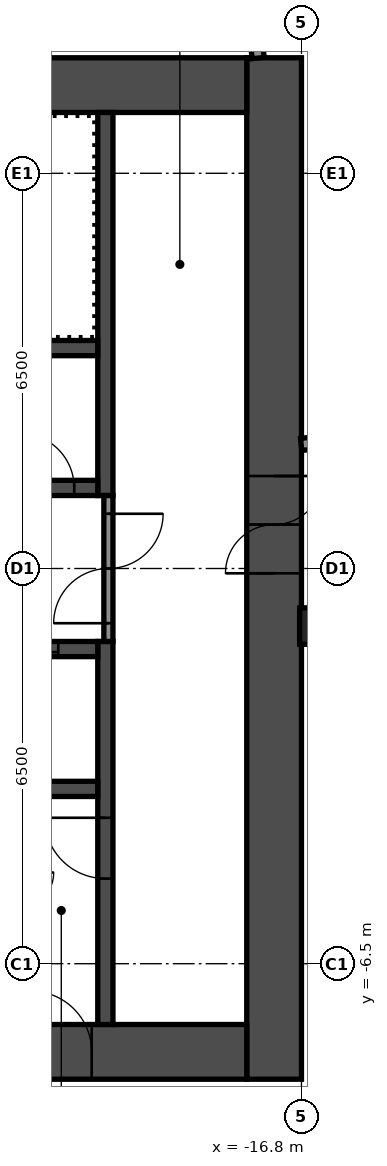
"""IFC4 building model, lengths in metres.
Left out: names, types, materials, properties, quantities, classifications, styles, units other than length and angle.
Written with IfcOpenShell. Run it as: python <this file> out.ifc"""

import sys

from ifc_helpers import new_model, si_unit, direction, frame, frame_2d, origin, origin_2d, place, context, subcontext, project, spatial, rectangle, hollow_rectangle, extrude, element, fill, save


model = new_model("IFC4")
c1 = context("Model", 3, precision=1e-05, world=origin(), true_north=direction((0.0, 1.0)))
c2 = subcontext(c1, "Body", "Model", "MODEL_VIEW")
j1 = project(units=[si_unit("LENGTHUNIT", "METRE"), si_unit("PLANEANGLEUNIT", "RADIAN")], contexts=[c1])
p1 = place(None, origin())
s1 = spatial("IfcSite", under=j1, at=p1, CompositionType="ELEMENT")
p2 = place(p1, origin())
s2 = spatial("IfcBuilding", under=s1, at=p2, CompositionType="ELEMENT")
p3 = place(p2, frame((0.0, 0.0, 239.0)))
s3 = spatial("IfcBuildingStorey", under=s2, at=p3, CompositionType="ELEMENT", Elevation=239.0)
p4 = place(p3, frame((-16.53, -0.947, 0.0), z_axis=(0.0, 0.0, 1.0), x_axis=(1.0, 0.0, 0.0)))
e1 = element("IfcColumn", 1, at=p4, inside=s3, PredefinedType="COLUMN", context=c2, shape_type="SweptSolid", body=[
    extrude(hollow_rectangle(XDim=0.6, YDim=0.6, WallThickness=0.025, InnerFilletRadius=0.038, OuterFilletRadius=0.062, at=origin_2d()), origin(), (0.0, 0.0, 1.0), 2.75),
])
p5 = place(p3, frame((-17.25, -8.4, 0.0), z_axis=(0.0, 0.0, 1.0), x_axis=(0.0, 1.0, 0.0)))
e2 = element("IfcWall", 2, at=p5, inside=s3, PredefinedType="SHEAR", context=c2, shape_type="SweptSolid", body=[
    extrude(rectangle(XDim=16.8, YDim=0.9, at=frame_2d((8.4, 0.0))), origin(), (0.0, 0.0, 1.0), 2.75),
])
p6 = place(p5, frame((8.321, 0.0, 0.0)))
e3 = element("IfcOpeningElement", 3, at=p6, cuts=e2, PredefinedType="OPENING", context=c2, shape_type="SweptSolid", body=[
    extrude(rectangle(XDim=1.6, YDim=2.1, at=frame_2d((0.8, 1.05))), frame((0.0, 0.46, 0.0), z_axis=(0.0, -1.0, 0.0), x_axis=(1.0, 0.0, 0.0)), (0.0, 0.0, 1.0), 0.92),
])
p7 = place(p3, frame((-32.7, 7.95, 0.0), z_axis=(0.0, 0.0, 1.0), x_axis=(1.0, 0.0, 0.0)))
e4 = element("IfcWall", 4, at=p7, inside=s3, PredefinedType="SHEAR", context=c2, shape_type="SweptSolid", body=[
    extrude(rectangle(XDim=15.0, YDim=0.9, at=frame_2d((7.5, 0.0))), origin(), (0.0, 0.0, 1.0), 2.75),
])
p8 = place(p7, frame((3.4, 0.0, 0.0)))
e5 = element("IfcOpeningElement", 5, at=p8, cuts=e4, PredefinedType="OPENING", context=c2, shape_type="SweptSolid", body=[
    extrude(rectangle(XDim=1.2, YDim=2.1, at=frame_2d((0.6, 1.05))), frame((0.0, 0.46, 0.0), z_axis=(0.0, -1.0, 0.0), x_axis=(1.0, 0.0, 0.0)), (0.0, 0.0, 1.0), 0.92),
])
p9 = place(p7, frame((0.75, 0.0, 0.0)))
e6 = element("IfcOpeningElement", 6, at=p9, cuts=e4, PredefinedType="OPENING", context=c2, shape_type="SweptSolid", body=[
    extrude(rectangle(XDim=0.9, YDim=2.1, at=frame_2d((0.45, 1.05))), frame((0.0, 0.46, 0.0), z_axis=(0.0, -1.0, 0.0), x_axis=(1.0, 0.0, 0.0)), (0.0, 0.0, 1.0), 0.92),
])
p10 = place(p3, frame((-32.7, -7.95, 0.0), z_axis=(0.0, 0.0, 1.0), x_axis=(1.0, 0.0, 0.0)))
e7 = element("IfcWall", 7, at=p10, inside=s3, PredefinedType="SHEAR", context=c2, shape_type="SweptSolid", body=[
    extrude(rectangle(XDim=15.0, YDim=0.9, at=frame_2d((7.5, 0.0))), origin(), (0.0, 0.0, 1.0), 2.75),
])
p11 = place(p10, frame((11.45, 0.0, 0.0)))
e8 = element("IfcOpeningElement", 8, at=p11, cuts=e7, PredefinedType="OPENING", context=c2, shape_type="SweptSolid", body=[
    extrude(rectangle(XDim=1.0, YDim=2.1, at=frame_2d((0.5, 1.05))), frame((0.0, 0.46, 0.0), z_axis=(0.0, -1.0, 0.0), x_axis=(1.0, 0.0, 0.0)), (0.0, 0.0, 1.0), 0.92),
])
p12 = place(p3, frame((-20.025, 1.2, 0.0), z_axis=(0.0, 0.0, 1.0), x_axis=(0.0, 1.0, 0.0)))
e9 = element("IfcWall", 9, at=p12, inside=s3, PredefinedType="SHEAR", context=c2, shape_type="SweptSolid", body=[
    extrude(rectangle(XDim=6.3, YDim=0.25, at=frame_2d((3.15, 0.0))), origin(), (0.0, 0.0, 1.0), 2.75),
])
p13 = place(p3, frame((-20.025, -7.5, 0.0), z_axis=(0.0, 0.0, 1.0), x_axis=(0.0, 1.0, 0.0)))
e10 = element("IfcWall", 10, at=p13, inside=s3, PredefinedType="SHEAR", context=c2, shape_type="SweptSolid", body=[
    extrude(rectangle(XDim=6.3, YDim=0.25, at=frame_2d((3.15, 0.0))), origin(), (0.0, 0.0, 1.0), 2.75),
])
p14 = place(p13, frame((2.4, 0.0, 0.0)))
e11 = element("IfcOpeningElement", 11, at=p14, cuts=e10, PredefinedType="OPENING", context=c2, shape_type="SweptSolid", body=[
    extrude(rectangle(XDim=1.0, YDim=2.1, at=frame_2d((0.5, 1.05))), frame((0.0, 0.135, 0.0), z_axis=(0.0, -1.0, 0.0), x_axis=(1.0, 0.0, 0.0)), (0.0, 0.0, 1.0), 0.27),
])
p15 = place(p3, frame((-27.65, 1.325, 0.0), z_axis=(0.0, 0.0, 1.0), x_axis=(1.0, 0.0, 0.0)))
e12 = element("IfcWall", 12, at=p15, inside=s3, PredefinedType="SHEAR", context=c2, shape_type="SweptSolid", body=[
    extrude(rectangle(XDim=7.5, YDim=0.25, at=frame_2d((3.75, 0.0))), origin(), (0.0, 0.0, 1.0), 2.75),
])
p16 = place(p15, frame((6.212, 0.0, 0.0)))
e13 = element("IfcOpeningElement", 13, at=p16, cuts=e12, PredefinedType="OPENING", context=c2, shape_type="SweptSolid", body=[
    extrude(rectangle(XDim=0.9, YDim=2.1, at=frame_2d((0.45, 1.05))), frame((0.0, 0.135, 0.0), z_axis=(0.0, -1.0, 0.0), x_axis=(1.0, 0.0, 0.0)), (0.0, 0.0, 1.0), 0.27),
])
p17 = place(p15, frame((2.512, 0.0, 0.0)))
e14 = element("IfcOpeningElement", 14, at=p17, cuts=e12, PredefinedType="OPENING", context=c2, shape_type="SweptSolid", body=[
    extrude(rectangle(XDim=0.9, YDim=2.1, at=frame_2d((0.45, 1.05))), frame((0.0, 0.135, 0.0), z_axis=(0.0, -1.0, 0.0), x_axis=(1.0, 0.0, 0.0)), (0.0, 0.0, 1.0), 0.27),
])
p18 = place(p3, frame((-27.65, 3.625, 0.0), z_axis=(0.0, 0.0, 1.0), x_axis=(1.0, 0.0, 0.0)))
e15 = element("IfcWall", 15, at=p18, inside=s3, PredefinedType="SHEAR", context=c2, shape_type="SweptSolid", body=[
    extrude(rectangle(XDim=7.5, YDim=0.25, at=frame_2d((3.75, 0.0))), origin(), (0.0, 0.0, 1.0), 2.75),
])
p19 = place(p3, frame((-27.65, -1.325, 0.0), z_axis=(0.0, 0.0, 1.0), x_axis=(1.0, 0.0, 0.0)))
e16 = element("IfcWall", 16, at=p19, inside=s3, PredefinedType="SHEAR", context=c2, shape_type="SweptSolid", body=[
    extrude(rectangle(XDim=7.5, YDim=0.25, at=frame_2d((3.75, 0.0))), origin(), (0.0, 0.0, 1.0), 2.75),
])
p20 = place(p19, frame((5.75, 0.0, 0.0)))
e17 = element("IfcOpeningElement", 17, at=p20, cuts=e16, PredefinedType="OPENING", context=c2, shape_type="SweptSolid", body=[
    extrude(rectangle(XDim=1.1, YDim=2.1, at=frame_2d((0.55, 1.05))), frame((0.0, 0.135, 0.0), z_axis=(0.0, -1.0, 0.0), x_axis=(1.0, 0.0, 0.0)), (0.0, 0.0, 1.0), 0.27),
])
p21 = place(p19, frame((3.35, 0.0, 0.0)))
e18 = element("IfcOpeningElement", 18, at=p21, cuts=e16, PredefinedType="OPENING", context=c2, shape_type="SweptSolid", body=[
    extrude(rectangle(XDim=1.1, YDim=2.1, at=frame_2d((0.55, 1.05))), frame((0.0, 0.135, 0.0), z_axis=(0.0, -1.0, 0.0), x_axis=(1.0, 0.0, 0.0)), (0.0, 0.0, 1.0), 0.27),
])
p22 = place(p19, frame((0.95, 0.0, 0.0)))
e19 = element("IfcOpeningElement", 19, at=p22, cuts=e16, PredefinedType="OPENING", context=c2, shape_type="SweptSolid", body=[
    extrude(rectangle(XDim=1.1, YDim=2.1, at=frame_2d((0.55, 1.05))), frame((0.0, 0.135, 0.0), z_axis=(0.0, -1.0, 0.0), x_axis=(1.0, 0.0, 0.0)), (0.0, 0.0, 1.0), 0.27),
])
p23 = place(p3, frame((-27.65, -3.625, 0.0), z_axis=(0.0, 0.0, 1.0), x_axis=(1.0, 0.0, 0.0)))
e20 = element("IfcWall", 20, at=p23, inside=s3, PredefinedType="SHEAR", context=c2, shape_type="SweptSolid", body=[
    extrude(rectangle(XDim=7.5, YDim=0.25, at=frame_2d((3.75, 0.0))), origin(), (0.0, 0.0, 1.0), 2.75),
])
p24 = place(p3, frame((-19.975, -1.2, 0.0), z_axis=(0.0, 0.0, 1.0), x_axis=(0.0, 1.0, 0.0)))
e21 = element("IfcWall", 21, at=p24, inside=s3, PredefinedType="PARTITIONING", context=c2, shape_type="SweptSolid", body=[
    extrude(rectangle(XDim=2.4, YDim=0.15, at=frame_2d((1.2, 0.0))), origin(), (0.0, 0.0, 1.0), 2.75),
])
p25 = place(p24, frame((0.3, 0.0, 0.0)))
e22 = element("IfcOpeningElement", 22, at=p25, cuts=e21, PredefinedType="OPENING", context=c2, shape_type="SweptSolid", body=[
    extrude(rectangle(XDim=1.8, YDim=2.1, at=frame_2d((0.9, 1.05))), frame((0.0, 0.085, 0.0), z_axis=(0.0, -1.0, 0.0), x_axis=(1.0, 0.0, 0.0)), (0.0, 0.0, 1.0), 0.17),
])
p26 = place(p3, frame((-16.805, 2.041, 0.0), z_axis=(0.0, 0.0, 1.0), x_axis=(0.994521146831, 0.104535584879, 0.0)))
e23 = element("IfcWall", 23, at=p26, inside=s3, PredefinedType="PARTITIONING", context=c2, shape_type="SweptSolid", body=[
    extrude(rectangle(XDim=33.561, YDim=0.2, at=frame_2d((16.78, 0.0))), origin(), (0.0, 0.0, 1.0), 2.75),
])
p27 = place(p26, frame((2.201, 0.0, 0.0)))
e24 = element("IfcOpeningElement", 24, at=p27, cuts=e23, PredefinedType="OPENING", context=c2, shape_type="SweptSolid", body=[
    extrude(rectangle(XDim=0.9, YDim=2.1, at=frame_2d((0.45, 1.05))), frame((0.0, 0.11, 0.0), z_axis=(0.0, -1.0, 0.0), x_axis=(1.0, 0.0, 0.0)), (0.0, 0.0, 1.0), 0.22),
])
p28 = place(p26, frame((6.401, 0.0, 0.0)))
e25 = element("IfcOpeningElement", 25, at=p28, cuts=e23, PredefinedType="OPENING", context=c2, shape_type="SweptSolid", body=[
    extrude(rectangle(XDim=0.9, YDim=2.1, at=frame_2d((0.45, 1.05))), frame((0.0, 0.11, 0.0), z_axis=(0.0, -1.0, 0.0), x_axis=(1.0, 0.0, 0.0)), (0.0, 0.0, 1.0), 0.22),
])
p29 = place(p26, frame((10.516, 0.0, 0.0)))
e26 = element("IfcOpeningElement", 26, at=p29, cuts=e23, PredefinedType="OPENING", context=c2, shape_type="SweptSolid", body=[
    extrude(rectangle(XDim=0.9, YDim=2.1, at=frame_2d((0.45, 1.05))), frame((0.0, 0.11, 0.0), z_axis=(0.0, -1.0, 0.0), x_axis=(1.0, 0.0, 0.0)), (0.0, 0.0, 1.0), 0.22),
])
p30 = place(p26, frame((14.716, 0.0, 0.0)))
e27 = element("IfcOpeningElement", 27, at=p30, cuts=e23, PredefinedType="OPENING", context=c2, shape_type="SweptSolid", body=[
    extrude(rectangle(XDim=0.9, YDim=2.1, at=frame_2d((0.45, 1.05))), frame((0.0, 0.11, 0.0), z_axis=(0.0, -1.0, 0.0), x_axis=(1.0, 0.0, 0.0)), (0.0, 0.0, 1.0), 0.22),
])
p31 = place(p26, frame((18.241, 0.0, 0.0)))
e28 = element("IfcOpeningElement", 28, at=p31, cuts=e23, PredefinedType="OPENING", context=c2, shape_type="SweptSolid", body=[
    extrude(rectangle(XDim=0.9, YDim=2.1, at=frame_2d((0.45, 1.05))), frame((0.0, 0.11, 0.0), z_axis=(0.0, -1.0, 0.0), x_axis=(1.0, 0.0, 0.0)), (0.0, 0.0, 1.0), 0.22),
])
p32 = place(p26, frame((22.441, 0.0, 0.0)))
e29 = element("IfcOpeningElement", 29, at=p32, cuts=e23, PredefinedType="OPENING", context=c2, shape_type="SweptSolid", body=[
    extrude(rectangle(XDim=0.9, YDim=2.1, at=frame_2d((0.45, 1.05))), frame((0.0, 0.11, 0.0), z_axis=(0.0, -1.0, 0.0), x_axis=(1.0, 0.0, 0.0)), (0.0, 0.0, 1.0), 0.22),
])
p33 = place(p26, frame((26.981, 0.0, 0.0)))
e30 = element("IfcOpeningElement", 30, at=p33, cuts=e23, PredefinedType="OPENING", context=c2, shape_type="SweptSolid", body=[
    extrude(rectangle(XDim=0.9, YDim=2.1, at=frame_2d((0.45, 1.05))), frame((0.0, 0.11, 0.0), z_axis=(0.0, -1.0, 0.0), x_axis=(1.0, 0.0, 0.0)), (0.0, 0.0, 1.0), 0.22),
])
p34 = place(p26, frame((31.181, 0.0, 0.0)))
e31 = element("IfcOpeningElement", 31, at=p34, cuts=e23, PredefinedType="OPENING", context=c2, shape_type="SweptSolid", body=[
    extrude(rectangle(XDim=0.9, YDim=2.1, at=frame_2d((0.45, 1.05))), frame((0.0, 0.11, 0.0), z_axis=(0.0, -1.0, 0.0), x_axis=(1.0, 0.0, 0.0)), (0.0, 0.0, 1.0), 0.22),
])
p35 = place(p3, frame((-17.512, 8.395, 0.0), z_axis=(0.0, 0.0, 1.0), x_axis=(-0.104524714473, 0.994522289375, 0.0)))
e32 = element("IfcWall", 32, at=p35, inside=s3, PredefinedType="PARTITIONING", context=c2, shape_type="SweptSolid", body=[
    extrude(rectangle(XDim=9.607, YDim=0.2, at=frame_2d((4.803, 0.0))), origin(), (0.0, 0.0, 1.0), 2.75),
])
p36 = place(p6, origin())
e33 = element("IfcDoor", 33, at=p36, inside=s3, OperationType="DOUBLE_DOOR_SINGLE_SWING", PredefinedType="DOOR", context=c2, shape_type="SweptSolid", body=[
    extrude(rectangle(XDim=1.6, YDim=2.1, at=frame_2d((0.8, 1.05))), frame((0.0, 0.025, 0.0), z_axis=(0.0, -1.0, 0.0), x_axis=(1.0, 0.0, 0.0)), (0.0, 0.0, 1.0), 0.05),
])
fill(e3, e33)
p37 = place(p11, origin())
e34 = element("IfcDoor", 34, at=p37, inside=s3, OperationType="SINGLE_SWING_RIGHT", PredefinedType="DOOR", context=c2, shape_type="SweptSolid", body=[
    extrude(rectangle(XDim=1.0, YDim=2.1, at=frame_2d((0.5, 1.05))), frame((0.0, 0.025, 0.0), z_axis=(0.0, -1.0, 0.0), x_axis=(1.0, 0.0, 0.0)), (0.0, 0.0, 1.0), 0.05),
])
fill(e8, e34)
p38 = place(p14, origin())
e35 = element("IfcDoor", 35, at=p38, inside=s3, OperationType="SINGLE_SWING_LEFT", PredefinedType="DOOR", context=c2, shape_type="SweptSolid", body=[
    extrude(rectangle(XDim=1.0, YDim=2.1, at=frame_2d((0.5, 1.05))), frame((0.0, 0.025, 0.0), z_axis=(0.0, -1.0, 0.0), x_axis=(1.0, 0.0, 0.0)), (0.0, 0.0, 1.0), 0.05),
])
fill(e11, e35)
p39 = place(p25, origin())
e36 = element("IfcDoor", 36, at=p39, inside=s3, OperationType="DOUBLE_DOOR_SINGLE_SWING", PredefinedType="DOOR", context=c2, shape_type="SweptSolid", body=[
    extrude(rectangle(XDim=1.8, YDim=2.1, at=frame_2d((0.9, 1.05))), frame((0.0, 0.025, 0.0), z_axis=(0.0, -1.0, 0.0), x_axis=(1.0, 0.0, 0.0)), (0.0, 0.0, 1.0), 0.05),
])
fill(e22, e36)
p40 = place(p16, origin())
e37 = element("IfcDoor", 37, at=p40, inside=s3, OperationType="SINGLE_SWING_RIGHT", PredefinedType="DOOR", context=c2, shape_type="SweptSolid", body=[
    extrude(rectangle(XDim=0.9, YDim=2.1, at=frame_2d((0.45, 1.05))), frame((0.0, 0.025, 0.0), z_axis=(0.0, -1.0, 0.0), x_axis=(1.0, 0.0, 0.0)), (0.0, 0.0, 1.0), 0.05),
])
fill(e13, e37)
p41 = place(p20, origin())
e38 = element("IfcDoor", 38, at=p41, inside=s3, OperationType="DOUBLE_DOOR_SLIDING", PredefinedType="DOOR", context=c2, shape_type="SweptSolid", body=[
    extrude(rectangle(XDim=1.1, YDim=2.1, at=frame_2d((0.55, 1.05))), frame((0.0, 0.025, 0.0), z_axis=(0.0, -1.0, 0.0), x_axis=(1.0, 0.0, 0.0)), (0.0, 0.0, 1.0), 0.05),
])
fill(e17, e38)
save(model, sys.argv[1])
